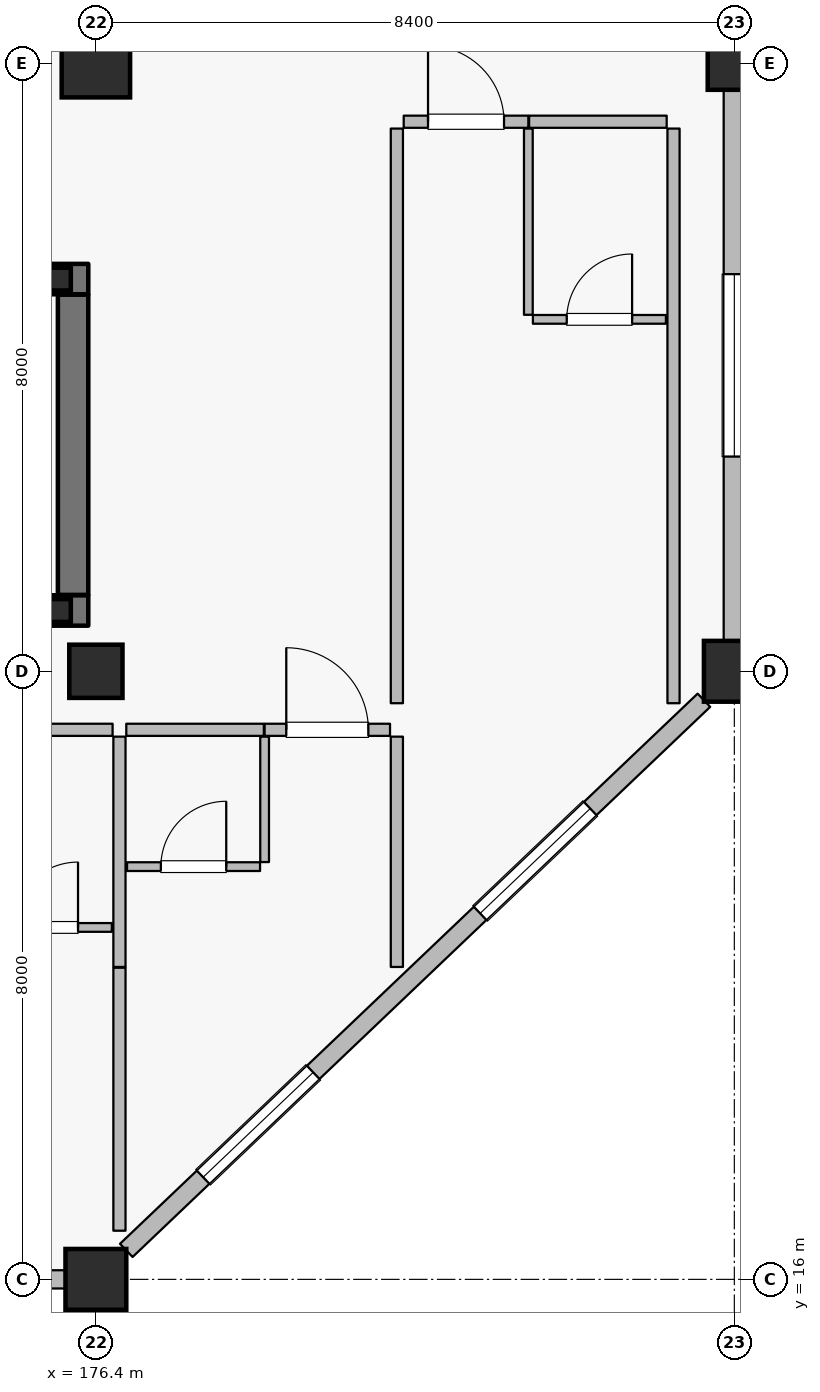
"""IFC4 building model, lengths in metres.
Left out: names, types, materials, properties, quantities, classifications, styles, units other than length and angle.
Written with IfcOpenShell. Run it as: python <this file> out.ifc"""

import sys

from ifc_helpers import new_model, si_unit, direction, frame, frame_2d, origin, origin_2d, place, context, subcontext, project, spatial, rectangle, hollow_rectangle, extrude, element, fill, save


model = new_model("IFC4")
c1 = context("Model", 3, precision=1e-05, world=origin(), true_north=direction((0.0, 1.0)))
c2 = subcontext(c1, "Body", "Model", "MODEL_VIEW")
j1 = project(units=[si_unit("LENGTHUNIT", "METRE"), si_unit("PLANEANGLEUNIT", "RADIAN")], contexts=[c1])
p1 = place(None, origin())
s1 = spatial("IfcSite", under=j1, at=p1, CompositionType="ELEMENT")
p2 = place(p1, origin())
s2 = spatial("IfcBuilding", under=s1, at=p2, CompositionType="ELEMENT")
p3 = place(p2, frame((0.0, 0.0, 11.4)))
s3 = spatial("IfcBuildingStorey", under=s2, at=p3, CompositionType="ELEMENT", Elevation=11.4)
p4 = place(p3, frame((176.4, 16.0, 0.0), z_axis=(0.0, 0.0, 1.0), x_axis=(1.0, 0.0, 0.0)))
e1 = element("IfcColumn", 1, at=p4, inside=s3, PredefinedType="COLUMN", context=c2, shape_type="SweptSolid", body=[
    extrude(rectangle(XDim=0.8, YDim=0.8, at=origin_2d()), origin(), (0.0, 0.0, 1.0), 4.8),
])
p5 = place(p3, frame((176.4, 32.0, 0.0), z_axis=(0.0, 0.0, 1.0), x_axis=(1.0, 0.0, 0.0)))
e2 = element("IfcColumn", 2, at=p5, inside=s3, PredefinedType="COLUMN", context=c2, shape_type="SweptSolid", body=[
    extrude(rectangle(XDim=0.9, YDim=0.9, at=origin_2d()), origin(), (0.0, 0.0, 1.0), 4.8),
])
p6 = place(p3, frame((184.8, 24.0, 0.0), z_axis=(0.0, 0.0, 1.0), x_axis=(1.0, 0.0, 0.0)))
e3 = element("IfcColumn", 3, at=p6, inside=s3, PredefinedType="COLUMN", context=c2, shape_type="SweptSolid", body=[
    extrude(rectangle(XDim=0.8, YDim=0.8, at=origin_2d()), origin(), (0.0, 0.0, 1.0), 4.8),
])
for number, where, z_axis, x_axis in (
    (4, (176.4, 24.0, 0.0), (0.0, 0.0, 1.0), (1.0, 0.0, 0.0)),
    (5, (184.8, 32.0, 0.0), (0.0, 0.0, 1.0), (1.0, 0.0, 0.0)),
):
    element("IfcColumn", number, at=place(p3, frame(where, z_axis=z_axis, x_axis=x_axis)), inside=s3, PredefinedType="COLUMN", context=c2, shape_type="SweptSolid", body=[
        extrude(rectangle(XDim=0.7, YDim=0.7, at=origin_2d()), origin(), (0.0, 0.0, 1.0), 4.8),
    ])
p7 = place(p3, frame((176.0, 16.0, 0.0), z_axis=(0.0, 0.0, 1.0), x_axis=(-1.0, 0.0, 0.0)))
e6 = element("IfcWall", 6, at=p7, inside=s3, PredefinedType="SOLIDWALL", context=c2, shape_type="SweptSolid", body=[
    extrude(rectangle(XDim=7.6, YDim=0.24, at=frame_2d((3.8, 0.0))), origin(), (0.0, 0.0, 1.0), 4.13),
])
p8 = place(p7, frame((0.415, 0.0, 0.8)))
e7 = element("IfcOpeningElement", 7, at=p8, cuts=e6, PredefinedType="OPENING", context=c2, shape_type="SweptSolid", body=[
    extrude(rectangle(XDim=2.0, YDim=1.75, at=frame_2d((1.0, 0.875))), frame((0.0, 0.13, 0.0), z_axis=(0.0, -1.0, 0.0), x_axis=(1.0, 0.0, 0.0)), (0.0, 0.0, 1.0), 0.26),
])
p9 = place(p7, frame((3.755, 0.0, 0.8)))
e8 = element("IfcOpeningElement", 8, at=p9, cuts=e6, PredefinedType="OPENING", context=c2, shape_type="SweptSolid", body=[
    extrude(rectangle(XDim=2.0, YDim=1.75, at=frame_2d((1.0, 0.875))), frame((0.0, 0.13, 0.0), z_axis=(0.0, -1.0, 0.0), x_axis=(1.0, 0.0, 0.0)), (0.0, 0.0, 1.0), 0.26),
])
p10 = place(p3, frame((184.4, 23.619, 0.0), z_axis=(0.0, 0.0, 1.0), x_axis=(-0.724145676014, -0.689647040094, 0.0)))
e9 = element("IfcWall", 9, at=p10, inside=s3, PredefinedType="SOLIDWALL", context=c2, shape_type="SweptSolid", body=[
    extrude(rectangle(XDim=10.495, YDim=0.24, at=frame_2d((5.248, 0.0))), origin(), (0.0, 0.0, 1.0), 4.13),
])
p11 = place(p10, frame((2.066, 0.0, 0.8)))
e10 = element("IfcOpeningElement", 10, at=p11, cuts=e9, PredefinedType="OPENING", context=c2, shape_type="SweptSolid", body=[
    extrude(rectangle(XDim=2.0, YDim=1.75, at=frame_2d((1.0, 0.875))), frame((0.0, 0.13, 0.0), z_axis=(0.0, -1.0, 0.0), x_axis=(1.0, 0.0, 0.0)), (0.0, 0.0, 1.0), 0.26),
])
p12 = place(p10, frame((7.099, 0.0, 0.8)))
e11 = element("IfcOpeningElement", 11, at=p12, cuts=e9, PredefinedType="OPENING", context=c2, shape_type="SweptSolid", body=[
    extrude(rectangle(XDim=2.0, YDim=1.75, at=frame_2d((1.0, 0.875))), frame((0.0, 0.13, 0.0), z_axis=(0.0, -1.0, 0.0), x_axis=(1.0, 0.0, 0.0)), (0.0, 0.0, 1.0), 0.26),
])
p13 = place(p3, frame((184.8, 31.65, 0.0), z_axis=(0.0, 0.0, 1.0), x_axis=(0.0, -1.0, 0.0)))
e12 = element("IfcWall", 12, at=p13, inside=s3, PredefinedType="SOLIDWALL", context=c2, shape_type="SweptSolid", body=[
    extrude(rectangle(XDim=7.25, YDim=0.28, at=frame_2d((3.625, 0.0))), origin(), (0.0, 0.0, 1.0), 3.9),
])
p14 = place(p13, frame((2.425, 0.0, 0.75)))
e13 = element("IfcOpeningElement", 13, at=p14, cuts=e12, PredefinedType="OPENING", context=c2, shape_type="SweptSolid", body=[
    extrude(rectangle(XDim=2.4, YDim=1.65, at=frame_2d((1.2, 0.825))), frame((0.0, 0.15, 0.0), z_axis=(0.0, -1.0, 0.0), x_axis=(1.0, 0.0, 0.0)), (0.0, 0.0, 1.0), 0.3),
])
p15 = place(p3, frame((168.1, 24.8, 0.0), z_axis=(0.0, 0.0, 1.0), x_axis=(1.0, 0.0, 0.0)))
e14 = element("IfcWall", 14, at=p15, inside=s3, PredefinedType="SHEAR", context=c2, shape_type="SweptSolid", body=[
    extrude(rectangle(XDim=8.2, YDim=0.4, at=frame_2d((4.1, 0.0))), origin(), (0.0, 0.0, 1.0), 4.535),
])
p16 = place(p3, frame((176.1, 25.005, 0.0), z_axis=(0.0, 0.0, 1.0), x_axis=(0.0, 1.0, 0.0)))
e15 = element("IfcWall", 15, at=p16, inside=s3, PredefinedType="SHEAR", context=c2, shape_type="SweptSolid", body=[
    extrude(rectangle(XDim=3.95, YDim=0.4, at=frame_2d((1.975, 0.0))), origin(), (0.0, 0.0, 1.0), 4.535),
])
p17 = place(p3, frame((168.1, 29.16, 0.0), z_axis=(0.0, 0.0, 1.0), x_axis=(1.0, 0.0, 0.0)))
e16 = element("IfcWall", 16, at=p17, inside=s3, PredefinedType="SHEAR", context=c2, shape_type="SweptSolid", body=[
    extrude(rectangle(XDim=8.2, YDim=0.4, at=frame_2d((4.1, 0.0))), origin(), (0.0, 0.0, 1.0), 4.535),
])
p18 = place(p17, frame((0.43, 0.0, 0.0)))
e17 = element("IfcOpeningElement", 17, at=p18, cuts=e16, PredefinedType="OPENING", context=c2, shape_type="SweptSolid", body=[
    extrude(rectangle(XDim=1.16, YDim=2.2, at=frame_2d((0.58, 1.1))), frame((0.0, 0.21, 0.0), z_axis=(0.0, -1.0, 0.0), x_axis=(1.0, 0.0, 0.0)), (0.0, 0.0, 1.0), 0.42),
])
for number, where, z_axis, x_axis in (
    (18, (175.92, 24.8, -2.7), (0.0, 0.0, 1.0), (1.0, 0.0, 0.0)),
    (19, (175.92, 29.16, -2.7), (0.0, 0.0, 1.0), (1.0, 0.0, 0.0)),
):
    element("IfcColumn", number, at=place(p3, frame(where, z_axis=z_axis, x_axis=x_axis)), inside=s3, PredefinedType="COLUMN", context=c2, shape_type="SweptSolid", body=[
        extrude(hollow_rectangle(XDim=0.3, YDim=0.3, WallThickness=0.012, at=origin_2d()), origin(), (0.0, 0.0, 1.0), 4.92),
    ])
p19 = place(p3, frame((174.81, 23.23, 0.0), z_axis=(0.0, 0.0, 1.0), x_axis=(1.0, 0.0, 0.0)))
e20 = element("IfcWall", 20, at=p19, inside=s3, PredefinedType="PARTITIONING", context=c2, shape_type="SweptSolid", body=[
    extrude(rectangle(XDim=1.81, YDim=0.16, at=frame_2d((0.905, 0.0))), origin(), (0.0, 0.0, 1.0), 4.535),
])
p20 = place(p3, frame((174.86, 20.63, 0.0), z_axis=(0.0, 0.0, 1.0), x_axis=(1.0, 0.0, 0.0)))
e21 = element("IfcWall", 21, at=p20, inside=s3, PredefinedType="PARTITIONING", context=c2, shape_type="SweptSolid", body=[
    extrude(rectangle(XDim=1.75, YDim=0.115, at=frame_2d((0.875, 0.0))), origin(), (0.0, 0.0, 1.0), 4.535),
])
p21 = place(p20, frame((0.445, 0.0, 0.0)))
e22 = element("IfcOpeningElement", 22, at=p21, cuts=e21, PredefinedType="OPENING", context=c2, shape_type="SweptSolid", body=[
    extrude(rectangle(XDim=0.86, YDim=2.12, at=frame_2d((0.43, 1.06))), frame((0.0, 0.067, 0.0), z_axis=(0.0, -1.0, 0.0), x_axis=(1.0, 0.0, 0.0)), (0.0, 0.0, 1.0), 0.135),
])
p22 = place(p3, frame((176.71, 16.64, 0.0), z_axis=(0.0, 0.0, 1.0), x_axis=(0.0, 1.0, 0.0)))
e23 = element("IfcWall", 23, at=p22, inside=s3, PredefinedType="PARTITIONING", context=c2, shape_type="SweptSolid", body=[
    extrude(rectangle(XDim=3.46, YDim=0.16, at=frame_2d((1.73, 0.0))), origin(), (0.0, 0.0, 1.0), 4.535),
])
p23 = place(p3, frame((176.8, 23.23, 0.0), z_axis=(0.0, 0.0, 1.0), x_axis=(1.0, 0.0, 0.0)))
e24 = element("IfcWall", 24, at=p23, inside=s3, PredefinedType="PARTITIONING", context=c2, shape_type="SweptSolid", body=[
    extrude(rectangle(XDim=1.81, YDim=0.16, at=frame_2d((0.905, 0.0))), origin(), (0.0, 0.0, 1.0), 4.535),
])
p24 = place(p3, frame((178.62, 23.23, 0.0), z_axis=(0.0, 0.0, 1.0), x_axis=(1.0, 0.0, 0.0)))
e25 = element("IfcWall", 25, at=p24, inside=s3, PredefinedType="PARTITIONING", context=c2, shape_type="SweptSolid", body=[
    extrude(rectangle(XDim=1.65, YDim=0.16, at=frame_2d((0.825, 0.0))), origin(), (0.0, 0.0, 1.0), 4.535),
])
p25 = place(p24, frame((0.285, 0.0, 0.0)))
e26 = element("IfcOpeningElement", 26, at=p25, cuts=e25, PredefinedType="OPENING", context=c2, shape_type="SweptSolid", body=[
    extrude(rectangle(XDim=1.08, YDim=2.3, at=frame_2d((0.54, 1.15))), frame((0.0, 0.09, 0.0), z_axis=(0.0, -1.0, 0.0), x_axis=(1.0, 0.0, 0.0)), (0.0, 0.0, 1.0), 0.18),
])
p26 = place(p3, frame((178.62, 21.49, 0.0), z_axis=(0.0, 0.0, 1.0), x_axis=(0.0, 1.0, 0.0)))
e27 = element("IfcWall", 27, at=p26, inside=s3, PredefinedType="PARTITIONING", context=c2, shape_type="SweptSolid", body=[
    extrude(rectangle(XDim=1.65, YDim=0.115, at=frame_2d((0.825, 0.0))), origin(), (0.0, 0.0, 1.0), 4.535),
])
p27 = place(p3, frame((176.81, 21.43, 0.0), z_axis=(0.0, 0.0, 1.0), x_axis=(1.0, 0.0, 0.0)))
e28 = element("IfcWall", 28, at=p27, inside=s3, PredefinedType="PARTITIONING", context=c2, shape_type="SweptSolid", body=[
    extrude(rectangle(XDim=1.75, YDim=0.115, at=frame_2d((0.875, 0.0))), origin(), (0.0, 0.0, 1.0), 4.535),
])
p28 = place(p27, frame((0.445, 0.0, 0.0)))
e29 = element("IfcOpeningElement", 29, at=p28, cuts=e28, PredefinedType="OPENING", context=c2, shape_type="SweptSolid", body=[
    extrude(rectangle(XDim=0.86, YDim=2.12, at=frame_2d((0.43, 1.06))), frame((0.0, 0.067, 0.0), z_axis=(0.0, -1.0, 0.0), x_axis=(1.0, 0.0, 0.0)), (0.0, 0.0, 1.0), 0.135),
])
for number, where, z_axis, x_axis in (
    (30, (176.71, 20.11, 0.0), (0.0, 0.0, 1.0), (0.0, 1.0, 0.0)),
    (31, (180.36, 20.11, 0.0), (0.0, 0.0, 1.0), (0.0, 1.0, 0.0)),
):
    element("IfcWall", number, at=place(p3, frame(where, z_axis=z_axis, x_axis=x_axis)), inside=s3, PredefinedType="PARTITIONING", context=c2, shape_type="SweptSolid", body=[
        extrude(rectangle(XDim=3.03, YDim=0.16, at=frame_2d((1.515, 0.0))), origin(), (0.0, 0.0, 1.0), 4.535),
    ])
p29 = place(p3, frame((180.45, 31.23, 0.0), z_axis=(0.0, 0.0, 1.0), x_axis=(1.0, 0.0, 0.0)))
e32 = element("IfcWall", 32, at=p29, inside=s3, PredefinedType="PARTITIONING", context=c2, shape_type="SweptSolid", body=[
    extrude(rectangle(XDim=1.64, YDim=0.16, at=frame_2d((0.82, 0.0))), origin(), (0.0, 0.0, 1.0), 4.535),
])
p30 = place(p29, frame((0.32, 0.0, 0.0)))
e33 = element("IfcOpeningElement", 33, at=p30, cuts=e32, PredefinedType="OPENING", context=c2, shape_type="SweptSolid", body=[
    extrude(rectangle(XDim=1.0, YDim=2.25, at=frame_2d((0.5, 1.125))), frame((0.0, 0.09, 0.0), z_axis=(0.0, -1.0, 0.0), x_axis=(1.0, 0.0, 0.0)), (0.0, 0.0, 1.0), 0.18),
])
p31 = place(p3, frame((182.1, 31.23, 0.0), z_axis=(0.0, 0.0, 1.0), x_axis=(1.0, 0.0, 0.0)))
e34 = element("IfcWall", 34, at=p31, inside=s3, PredefinedType="PARTITIONING", context=c2, shape_type="SweptSolid", body=[
    extrude(rectangle(XDim=1.81, YDim=0.16, at=frame_2d((0.905, 0.0))), origin(), (0.0, 0.0, 1.0), 4.535),
])
p32 = place(p3, frame((182.09, 28.69, 0.0), z_axis=(0.0, 0.0, 1.0), x_axis=(0.0, 1.0, 0.0)))
e35 = element("IfcWall", 35, at=p32, inside=s3, PredefinedType="PARTITIONING", context=c2, shape_type="SweptSolid", body=[
    extrude(rectangle(XDim=2.45, YDim=0.115, at=frame_2d((1.225, 0.0))), origin(), (0.0, 0.0, 1.0), 4.535),
])
p33 = place(p3, frame((182.15, 28.63, 0.0), z_axis=(0.0, 0.0, 1.0), x_axis=(1.0, 0.0, 0.0)))
e36 = element("IfcWall", 36, at=p33, inside=s3, PredefinedType="PARTITIONING", context=c2, shape_type="SweptSolid", body=[
    extrude(rectangle(XDim=1.75, YDim=0.115, at=frame_2d((0.875, 0.0))), origin(), (0.0, 0.0, 1.0), 4.535),
])
p34 = place(p33, frame((0.445, 0.0, 0.0)))
e37 = element("IfcOpeningElement", 37, at=p34, cuts=e36, PredefinedType="OPENING", context=c2, shape_type="SweptSolid", body=[
    extrude(rectangle(XDim=0.86, YDim=2.12, at=frame_2d((0.43, 1.06))), frame((0.0, 0.067, 0.0), z_axis=(0.0, -1.0, 0.0), x_axis=(1.0, 0.0, 0.0)), (0.0, 0.0, 1.0), 0.135),
])
for number, where, z_axis, x_axis in (
    (38, (180.36, 23.58, 0.0), (0.0, 0.0, 1.0), (0.0, 1.0, 0.0)),
    (39, (184.0, 23.58, 0.0), (0.0, 0.0, 1.0), (0.0, 1.0, 0.0)),
):
    element("IfcWall", number, at=place(p3, frame(where, z_axis=z_axis, x_axis=x_axis)), inside=s3, PredefinedType="PARTITIONING", context=c2, shape_type="SweptSolid", body=[
        extrude(rectangle(XDim=7.56, YDim=0.16, at=frame_2d((3.78, 0.0))), origin(), (0.0, 0.0, 1.0), 4.535),
    ])
p35 = place(p11, origin())
e40 = element("IfcWindow", 40, at=p35, inside=s3, PartitioningType="DOUBLE_PANEL_VERTICAL", PredefinedType="WINDOW", context=c2, shape_type="SweptSolid", body=[
    extrude(rectangle(XDim=2.0, YDim=1.75, at=frame_2d((1.0, 0.875))), frame((0.0, 0.03, 0.0), z_axis=(0.0, -1.0, 0.0), x_axis=(1.0, 0.0, 0.0)), (0.0, 0.0, 1.0), 0.06),
])
fill(e10, e40)
p36 = place(p12, origin())
e41 = element("IfcWindow", 41, at=p36, inside=s3, PartitioningType="DOUBLE_PANEL_VERTICAL", PredefinedType="WINDOW", context=c2, shape_type="SweptSolid", body=[
    extrude(rectangle(XDim=2.0, YDim=1.75, at=frame_2d((1.0, 0.875))), frame((0.0, 0.03, 0.0), z_axis=(0.0, -1.0, 0.0), x_axis=(1.0, 0.0, 0.0)), (0.0, 0.0, 1.0), 0.06),
])
fill(e11, e41)
p37 = place(p14, origin())
e42 = element("IfcWindow", 42, at=p37, inside=s3, PartitioningType="DOUBLE_PANEL_VERTICAL", PredefinedType="WINDOW", context=c2, shape_type="SweptSolid", body=[
    extrude(rectangle(XDim=2.4, YDim=1.65, at=frame_2d((1.2, 0.825))), frame((0.0, 0.03, 0.0), z_axis=(0.0, -1.0, 0.0), x_axis=(1.0, 0.0, 0.0)), (0.0, 0.0, 1.0), 0.06),
])
fill(e13, e42)
p38 = place(p21, origin())
e43 = element("IfcDoor", 43, at=p38, inside=s3, OperationType="SINGLE_SWING_RIGHT", PredefinedType="DOOR", context=c2, shape_type="SweptSolid", body=[
    extrude(rectangle(XDim=0.86, YDim=2.12, at=frame_2d((0.43, 1.06))), frame((0.0, 0.025, 0.0), z_axis=(0.0, -1.0, 0.0), x_axis=(1.0, 0.0, 0.0)), (0.0, 0.0, 1.0), 0.05),
])
fill(e22, e43)
p39 = place(p25, origin())
e44 = element("IfcDoor", 44, at=p39, inside=s3, OperationType="SINGLE_SWING_LEFT", PredefinedType="DOOR", context=c2, shape_type="SweptSolid", body=[
    extrude(rectangle(XDim=1.08, YDim=2.3, at=frame_2d((0.54, 1.15))), frame((0.0, 0.025, 0.0), z_axis=(0.0, -1.0, 0.0), x_axis=(1.0, 0.0, 0.0)), (0.0, 0.0, 1.0), 0.05),
])
fill(e26, e44)
p40 = place(p28, origin())
e45 = element("IfcDoor", 45, at=p40, inside=s3, OperationType="SINGLE_SWING_RIGHT", PredefinedType="DOOR", context=c2, shape_type="SweptSolid", body=[
    extrude(rectangle(XDim=0.86, YDim=2.12, at=frame_2d((0.43, 1.06))), frame((0.0, 0.025, 0.0), z_axis=(0.0, -1.0, 0.0), x_axis=(1.0, 0.0, 0.0)), (0.0, 0.0, 1.0), 0.05),
])
fill(e29, e45)
p41 = place(p30, origin())
e46 = element("IfcDoor", 46, at=p41, inside=s3, OperationType="SINGLE_SWING_LEFT", PredefinedType="DOOR", context=c2, shape_type="SweptSolid", body=[
    extrude(rectangle(XDim=1.0, YDim=2.25, at=frame_2d((0.5, 1.125))), frame((0.0, 0.025, 0.0), z_axis=(0.0, -1.0, 0.0), x_axis=(1.0, 0.0, 0.0)), (0.0, 0.0, 1.0), 0.05),
])
fill(e33, e46)
p42 = place(p34, origin())
e47 = element("IfcDoor", 47, at=p42, inside=s3, OperationType="SINGLE_SWING_RIGHT", PredefinedType="DOOR", context=c2, shape_type="SweptSolid", body=[
    extrude(rectangle(XDim=0.86, YDim=2.12, at=frame_2d((0.43, 1.06))), frame((0.0, 0.025, 0.0), z_axis=(0.0, -1.0, 0.0), x_axis=(1.0, 0.0, 0.0)), (0.0, 0.0, 1.0), 0.05),
])
fill(e37, e47)
save(model, sys.argv[1])
